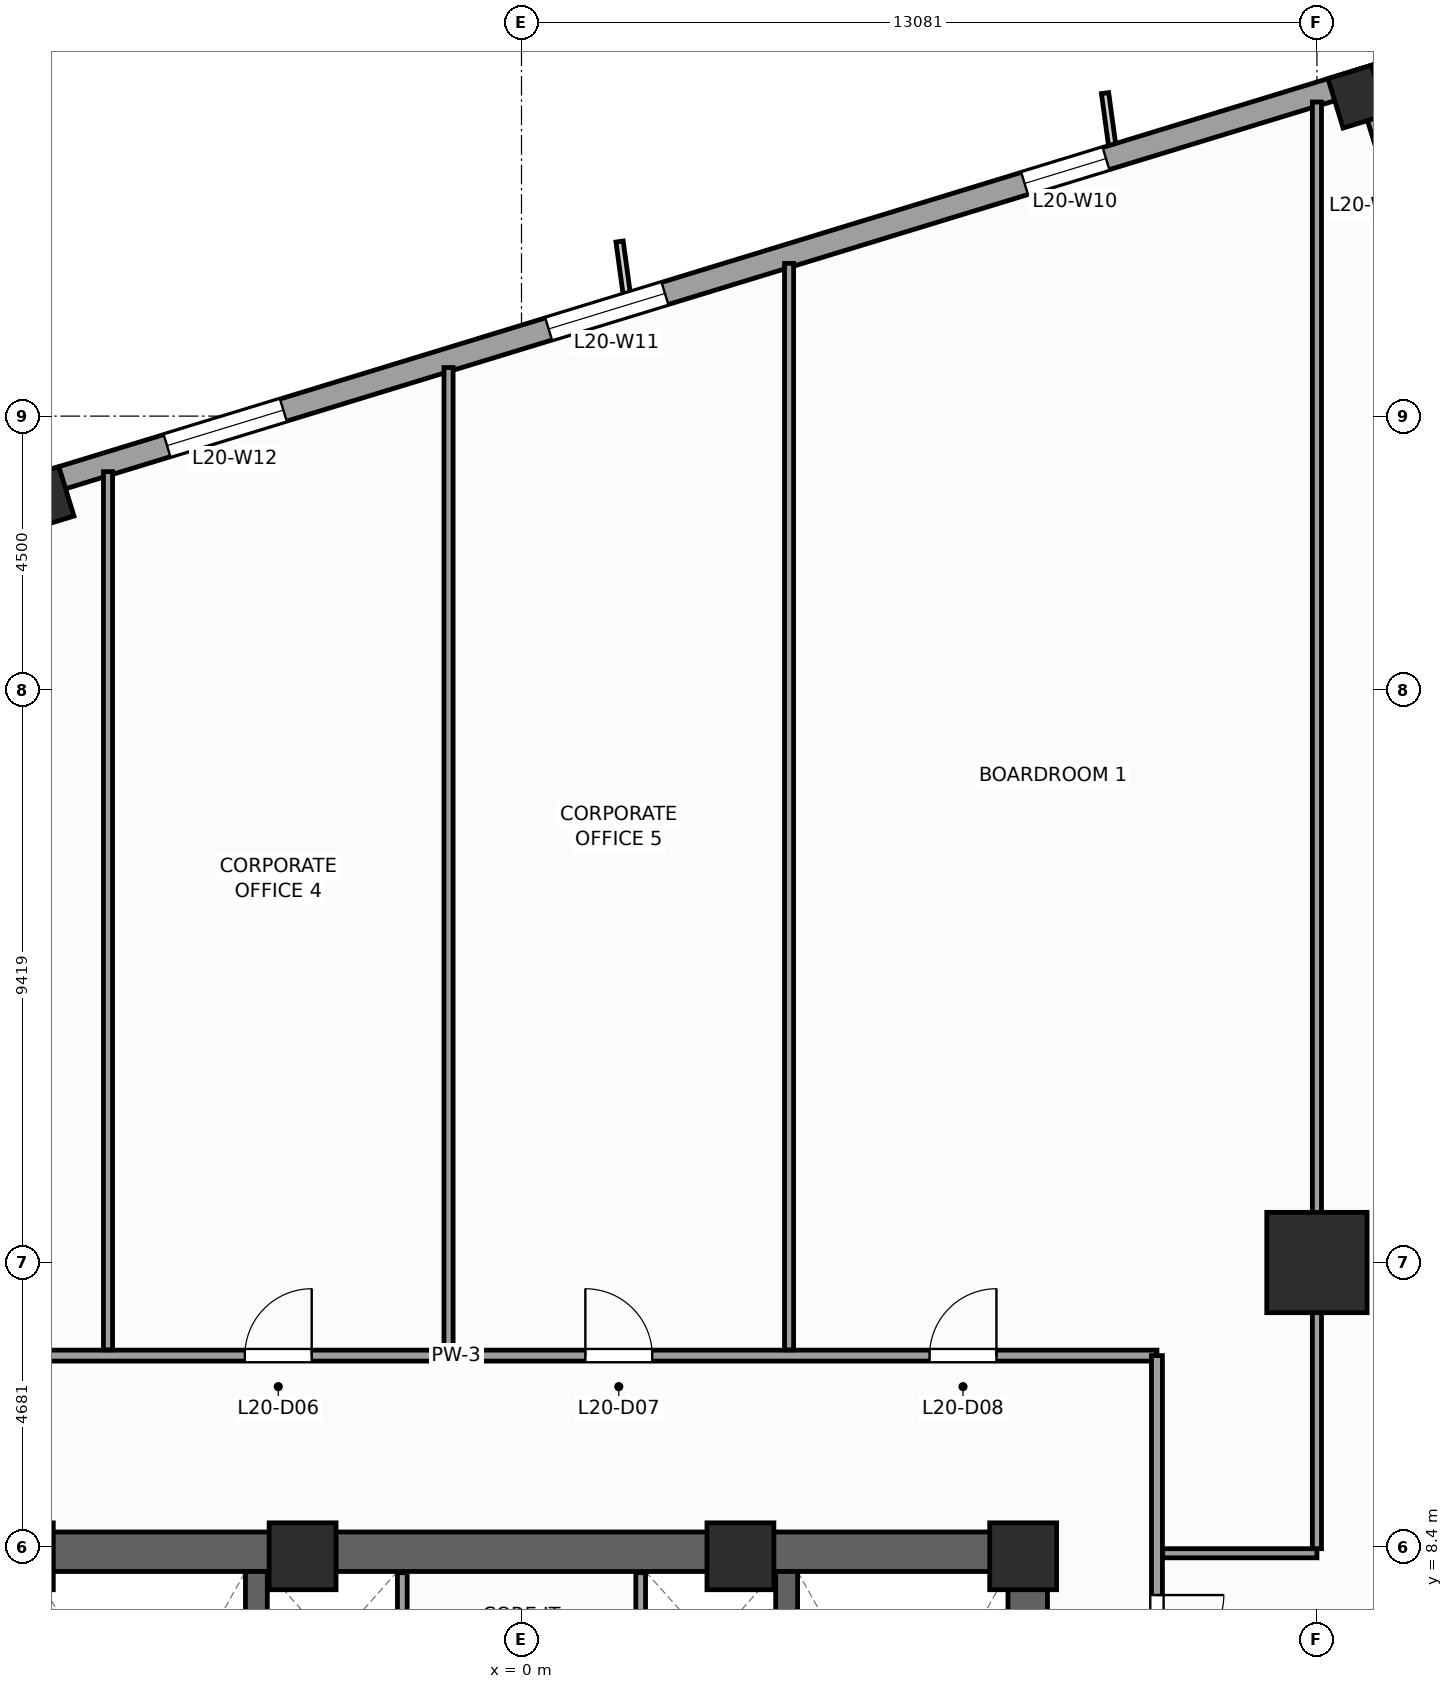
"""IFC4 building model, lengths in metres.
Left out: names, types, materials, properties, quantities, classifications, styles, units other than length and angle.
Written with IfcOpenShell. Run it as: python <this file> out.ifc"""

import sys

from ifc_helpers import new_model, si_unit, direction, frame, frame_2d, origin, origin_2d, place, context, subcontext, project, spatial, rectangle, extrude, source, transform, mapped, element, fill, save


model = new_model("IFC4")
c1 = context("Model", 3, precision=1e-05, world=origin(), true_north=direction((0.0, 1.0)))
c2 = subcontext(c1, "Body", "Model", "MODEL_VIEW")
j1 = project(units=[si_unit("LENGTHUNIT", "METRE"), si_unit("PLANEANGLEUNIT", "RADIAN")], contexts=[c1])
p1 = place(None, origin())
s1 = spatial("IfcSite", under=j1, at=p1, CompositionType="ELEMENT")
p2 = place(p1, origin())
s2 = spatial("IfcBuilding", under=s1, at=p2, CompositionType="ELEMENT")
p3 = place(p2, frame((0.0, 0.0, 87.2)))
s3 = spatial("IfcBuildingStorey", under=s2, at=p3, CompositionType="ELEMENT", Elevation=87.2)
p4 = place(p3, frame((-8.65, 8.325, 0.0), z_axis=(0.0, 0.0, 1.0), x_axis=(1.0, 0.0, 0.0)))
e1 = element("IfcWall", 1, at=p4, inside=s3, PredefinedType="SHEAR", context=c2, shape_type="SweptSolid", body=[
    extrude(rectangle(XDim=17.3, YDim=0.65, at=frame_2d((8.65, 0.0))), origin(), (0.0, 0.0, 1.0), 4.0),
])
p5 = place(p3, frame((8.325, -8.0, 0.0), z_axis=(0.0, 0.0, 1.0), x_axis=(0.0, 1.0, 0.0)))
e2 = element("IfcWall", 2, at=p5, inside=s3, PredefinedType="SHEAR", context=c2, shape_type="SweptSolid", body=[
    extrude(rectangle(XDim=16.0, YDim=0.65, at=frame_2d((8.0, 0.0))), origin(), (0.0, 0.0, 1.0), 4.0),
])
p6 = place(p5, frame((4.69, 0.0, 0.0)))
e3 = element("IfcOpeningElement", 3, at=p6, cuts=e2, PredefinedType="OPENING", context=c2, shape_type="SweptSolid", body=[
    extrude(rectangle(XDim=1.3, YDim=2.2, at=frame_2d((0.65, 1.1))), frame((0.0, 0.335, 0.0), z_axis=(0.0, -1.0, 0.0), x_axis=(1.0, 0.0, 0.0)), (0.0, 0.0, 1.0), 0.67),
])
for number, where, z_axis, x_axis in (
    (4, (-4.36, -8.0, 0.0), (0.0, 0.0, 1.0), (0.0, 1.0, 0.0)),
    (5, (4.36, -8.0, 0.0), (0.0, 0.0, 1.0), (0.0, 1.0, 0.0)),
):
    element("IfcWall", number, at=place(p3, frame(where, z_axis=z_axis, x_axis=x_axis)), inside=s3, PredefinedType="SHEAR", context=c2, shape_type="SweptSolid", body=[
        extrude(rectangle(XDim=16.0, YDim=0.36, at=frame_2d((8.0, 0.0))), origin(), (0.0, 0.0, 1.0), 4.0),
    ])
m1 = source(origin(), c2, "Body", "SweptSolid", [
    extrude(rectangle(XDim=1.1, YDim=1.1, at=origin_2d()), origin(), (0.0, 0.0, 1.0), 4.0),
])
for number, where, z_axis, x_axis in (
    (6, (8.25, 8.25, 0.0), (0.0, 0.0, 1.0), (1.0, 0.0, 0.0)),
    (7, (-8.25, 8.25, 0.0), (0.0, 0.0, 1.0), (1.0, 0.0, 0.0)),
    (8, (-3.6, 8.25, 0.0), (0.0, 0.0, 1.0), (1.0, 0.0, 0.0)),
    (9, (3.6, 8.25, 0.0), (0.0, 0.0, 1.0), (1.0, 0.0, 0.0)),
):
    element("IfcColumn", number, at=place(p3, frame(where, z_axis=z_axis, x_axis=x_axis)), inside=s3, PredefinedType="PILASTER", context=c2, shape_type="MappedRepresentation", body=[
        mapped(m1, transform((0.0, 0.0, 0.0), scale=1.0)),
    ])
m2 = source(origin(), c2, "Body", "SweptSolid", [
    extrude(rectangle(XDim=1.65, YDim=1.65, at=origin_2d()), origin(), (0.0, 0.0, 1.0), 4.0),
])
p7 = place(p3, frame((13.081, 13.081, 0.0), z_axis=(0.0, 0.0, 1.0), x_axis=(1.0, 0.0, 0.0)))
e10 = element("IfcColumn", 10, at=p7, inside=s3, PredefinedType="COLUMN", context=c2, shape_type="MappedRepresentation", body=[
    mapped(m2, transform((0.0, 0.0, 0.0), scale=1.0)),
])
m3 = source(origin(), c2, "Body", "SweptSolid", [
    extrude(rectangle(XDim=0.75, YDim=0.85, at=origin_2d()), origin(), (0.0, 0.0, 1.0), 4.0),
])
for number, where, z_axis, x_axis in (
    (11, (13.746, 32.253, 0.0), (0.0, 0.0, 1.0), (0.956, 0.292, 0.0)),
    (12, (-7.843, 25.653, 0.0), (0.0, 0.0, 1.0), (0.956, 0.292, 0.0)),
):
    element("IfcColumn", number, at=place(p3, frame(where, z_axis=z_axis, x_axis=x_axis)), inside=s3, PredefinedType="COLUMN", context=c2, shape_type="MappedRepresentation", body=[
        mapped(m3, transform((0.0, 0.0, 0.0), scale=1.0)),
    ])
p8 = place(p3, frame((15.144, 28.482, 0.0), z_axis=(0.0, 0.0, 1.0), x_axis=(-0.292373601522, 0.956304176051, 0.0)))
e13 = element("IfcWall", 13, at=p8, inside=s3, PredefinedType="STANDARD", context=c2, shape_type="SweptSolid", body=[
    extrude(rectangle(XDim=4.44, YDim=0.38, at=frame_2d((2.22, 0.0))), origin(), (0.0, 0.0, 1.0), 3.04),
])
p9 = place(p8, frame((1.52, 0.0, 0.51)))
e14 = element("IfcOpeningElement", 14, at=p9, cuts=e13, PredefinedType="OPENING", context=c2, shape_type="SweptSolid", body=[
    extrude(rectangle(XDim=1.4, YDim=2.4, at=frame_2d((0.7, 1.2))), frame((0.0, 0.2, 0.0), z_axis=(0.0, -1.0, 0.0), x_axis=(1.0, 0.0, 0.0)), (0.0, 0.0, 1.0), 0.4),
])
p10 = place(p3, frame((14.265, 32.658, 0.0), z_axis=(0.0, 0.0, 1.0), x_axis=(-0.956304320851, -0.292373127906, 0.0)))
e15 = element("IfcWall", 15, at=p10, inside=s3, PredefinedType="STANDARD", context=c2, shape_type="SweptSolid", body=[
    extrude(rectangle(XDim=46.38, YDim=0.38, at=frame_2d((23.19, 0.0))), origin(), (0.0, 0.0, 1.0), 3.14),
])
p11 = place(p10, frame((29.115, 0.0, 0.0)))
e16 = element("IfcOpeningElement", 16, at=p11, cuts=e15, PredefinedType="OPENING", context=c2, shape_type="SweptSolid", body=[
    extrude(rectangle(XDim=1.05, YDim=2.25, at=frame_2d((0.525, 1.125))), frame((0.0, 0.2, 0.0), z_axis=(0.0, -1.0, 0.0), x_axis=(1.0, 0.0, 0.0)), (0.0, 0.0, 1.0), 0.4),
])
p12 = place(p10, frame((4.865, 0.0, 0.51)))
e17 = element("IfcOpeningElement", 17, at=p12, cuts=e15, PredefinedType="OPENING", context=c2, shape_type="SweptSolid", body=[
    extrude(rectangle(XDim=1.4, YDim=2.4, at=frame_2d((0.7, 1.2))), frame((0.0, 0.2, 0.0), z_axis=(0.0, -1.0, 0.0), x_axis=(1.0, 0.0, 0.0)), (0.0, 0.0, 1.0), 0.4),
])
p13 = place(p10, frame((12.45, 0.0, 0.51)))
e18 = element("IfcOpeningElement", 18, at=p13, cuts=e15, PredefinedType="OPENING", context=c2, shape_type="SweptSolid", body=[
    extrude(rectangle(XDim=2.0, YDim=2.4, at=frame_2d((1.0, 1.2))), frame((0.0, 0.2, 0.0), z_axis=(0.0, -1.0, 0.0), x_axis=(1.0, 0.0, 0.0)), (0.0, 0.0, 1.0), 0.4),
])
p14 = place(p10, frame((19.012, 0.0, 0.51)))
e19 = element("IfcOpeningElement", 19, at=p14, cuts=e15, PredefinedType="OPENING", context=c2, shape_type="SweptSolid", body=[
    extrude(rectangle(XDim=2.0, YDim=2.4, at=frame_2d((1.0, 1.2))), frame((0.0, 0.2, 0.0), z_axis=(0.0, -1.0, 0.0), x_axis=(1.0, 0.0, 0.0)), (0.0, 0.0, 1.0), 0.4),
])
p15 = place(p10, frame((31.288, 0.0, 0.51)))
e20 = element("IfcOpeningElement", 20, at=p15, cuts=e15, PredefinedType="OPENING", context=c2, shape_type="SweptSolid", body=[
    extrude(rectangle(XDim=2.0, YDim=2.4, at=frame_2d((1.0, 1.2))), frame((0.0, 0.2, 0.0), z_axis=(0.0, -1.0, 0.0), x_axis=(1.0, 0.0, 0.0)), (0.0, 0.0, 1.0), 0.4),
])
p16 = place(p10, frame((39.187, 0.0, 0.51)))
e21 = element("IfcOpeningElement", 21, at=p16, cuts=e15, PredefinedType="OPENING", context=c2, shape_type="SweptSolid", body=[
    extrude(rectangle(XDim=1.4, YDim=2.4, at=frame_2d((0.7, 1.2))), frame((0.0, 0.2, 0.0), z_axis=(0.0, -1.0, 0.0), x_axis=(1.0, 0.0, 0.0)), (0.0, 0.0, 1.0), 0.4),
])
for number, where, z_axis, x_axis in (
    (22, (-1.96, 4.58, 0.0), (0.0, 0.0, 1.0), (0.0, 1.0, 0.0)),
    (23, (1.96, 4.58, 0.0), (0.0, 0.0, 1.0), (0.0, 1.0, 0.0)),
):
    element("IfcWall", number, at=place(p3, frame(where, z_axis=z_axis, x_axis=x_axis)), inside=s3, PredefinedType="PARTITIONING", context=c2, shape_type="SweptSolid", body=[
        extrude(rectangle(XDim=3.4, YDim=0.16, at=frame_2d((1.7, 0.0))), origin(), (0.0, 0.0, 1.0), 3.74),
    ])
p17 = place(p3, frame((-12.6, 11.55, 0.0), z_axis=(0.0, 0.0, 1.0), x_axis=(1.0, 0.0, 0.0)))
e24 = element("IfcWall", 24, at=p17, inside=s3, PredefinedType="PARTITIONING", context=c2, shape_type="SweptSolid", body=[
    extrude(rectangle(XDim=23.05, YDim=0.18, at=frame_2d((11.525, 0.0))), origin(), (0.0, 0.0, 1.0), 3.74),
])
p18 = place(p17, frame((2.514, 0.0, 0.0)))
e25 = element("IfcOpeningElement", 25, at=p18, cuts=e24, PredefinedType="OPENING", context=c2, shape_type="SweptSolid", body=[
    extrude(rectangle(XDim=1.1, YDim=2.2, at=frame_2d((0.55, 1.1))), frame((0.0, 0.1, 0.0), z_axis=(0.0, -1.0, 0.0), x_axis=(1.0, 0.0, 0.0)), (0.0, 0.0, 1.0), 0.2),
])
p19 = place(p17, frame((8.05, 0.0, 0.0)))
e26 = element("IfcOpeningElement", 26, at=p19, cuts=e24, PredefinedType="OPENING", context=c2, shape_type="SweptSolid", body=[
    extrude(rectangle(XDim=1.1, YDim=2.2, at=frame_2d((0.55, 1.1))), frame((0.0, 0.1, 0.0), z_axis=(0.0, -1.0, 0.0), x_axis=(1.0, 0.0, 0.0)), (0.0, 0.0, 1.0), 0.2),
])
p20 = place(p17, frame((13.65, 0.0, 0.0)))
e27 = element("IfcOpeningElement", 27, at=p20, cuts=e24, PredefinedType="OPENING", context=c2, shape_type="SweptSolid", body=[
    extrude(rectangle(XDim=1.1, YDim=2.2, at=frame_2d((0.55, 1.1))), frame((0.0, 0.1, 0.0), z_axis=(0.0, -1.0, 0.0), x_axis=(1.0, 0.0, 0.0)), (0.0, 0.0, 1.0), 0.2),
])
p21 = place(p17, frame((19.311, 0.0, 0.0)))
e28 = element("IfcOpeningElement", 28, at=p21, cuts=e24, PredefinedType="OPENING", context=c2, shape_type="SweptSolid", body=[
    extrude(rectangle(XDim=1.1, YDim=2.2, at=frame_2d((0.55, 1.1))), frame((0.0, 0.1, 0.0), z_axis=(0.0, -1.0, 0.0), x_axis=(1.0, 0.0, 0.0)), (0.0, 0.0, 1.0), 0.2),
])
p22 = place(p3, frame((10.45, 3.35, 0.0), z_axis=(0.0, 0.0, 1.0), x_axis=(0.0, 1.0, 0.0)))
e29 = element("IfcWall", 29, at=p22, inside=s3, PredefinedType="PARTITIONING", context=c2, shape_type="SweptSolid", body=[
    extrude(rectangle(XDim=8.2, YDim=0.18, at=frame_2d((4.1, 0.0))), origin(), (0.0, 0.0, 1.0), 3.74),
])
p23 = place(p22, frame((3.163, 0.0, 0.0)))
e30 = element("IfcOpeningElement", 30, at=p23, cuts=e29, PredefinedType="OPENING", context=c2, shape_type="SweptSolid", body=[
    extrude(rectangle(XDim=1.1, YDim=2.2, at=frame_2d((0.55, 1.1))), frame((0.0, 0.1, 0.0), z_axis=(0.0, -1.0, 0.0), x_axis=(1.0, 0.0, 0.0)), (0.0, 0.0, 1.0), 0.2),
])
p24 = place(p3, frame((-6.8, 11.645, 0.0), z_axis=(0.0, 0.0, 1.0), x_axis=(0.0, 1.0, 0.0)))
e31 = element("IfcWall", 31, at=p24, inside=s3, PredefinedType="PARTITIONING", context=c2, shape_type="SweptSolid", body=[
    extrude(rectangle(XDim=14.442, YDim=0.15, at=frame_2d((7.221, 0.0))), origin(), (0.0, 0.0, 1.0), 3.74),
])
p25 = place(p3, frame((-1.2, 11.645, 0.0), z_axis=(0.0, 0.0, 1.0), x_axis=(0.0, 1.0, 0.0)))
e32 = element("IfcWall", 32, at=p25, inside=s3, PredefinedType="PARTITIONING", context=c2, shape_type="SweptSolid", body=[
    extrude(rectangle(XDim=16.154, YDim=0.15, at=frame_2d((8.077, 0.0))), origin(), (0.0, 0.0, 1.0), 3.41),
])
p26 = place(p3, frame((4.4, 11.645, 0.0), z_axis=(0.0, 0.0, 1.0), x_axis=(0.0, 1.0, 0.0)))
e33 = element("IfcWall", 33, at=p26, inside=s3, PredefinedType="PARTITIONING", context=c2, shape_type="SweptSolid", body=[
    extrude(rectangle(XDim=17.866, YDim=0.15, at=frame_2d((8.933, 0.0))), origin(), (0.0, 0.0, 1.0), 3.41),
])
p27 = place(p3, frame((10.545, 8.3, 0.0), z_axis=(0.0, 0.0, 1.0), x_axis=(1.0, 0.0, 0.0)))
e34 = element("IfcWall", 34, at=p27, inside=s3, PredefinedType="PARTITIONING", context=c2, shape_type="SweptSolid", body=[
    extrude(rectangle(XDim=2.536, YDim=0.15, at=frame_2d((1.268, 0.0))), origin(), (0.0, 0.0, 1.0), 3.74),
])
p28 = place(p3, frame((13.081, 8.375, 0.0), z_axis=(0.0, 0.0, 1.0), x_axis=(0.0, 1.0, 0.0)))
e35 = element("IfcWall", 35, at=p28, inside=s3, PredefinedType="PARTITIONING", context=c2, shape_type="SweptSolid", body=[
    extrude(rectangle(XDim=23.79, YDim=0.15, at=frame_2d((11.895, 0.0))), origin(), (0.0, 0.0, 1.0), 2.732),
])
m4 = source(origin(), c2, "Body", "SweptSolid", [
    extrude(rectangle(XDim=1.4, YDim=2.4, at=frame_2d((0.7, 1.2))), frame((0.0, 0.03, 0.0), z_axis=(0.0, -1.0, 0.0), x_axis=(1.0, 0.0, 0.0)), (0.0, 0.0, 1.0), 0.06),
])
p29 = place(p12, origin())
e36 = element("IfcWindow", 36, at=p29, inside=s3, PartitioningType="SINGLE_PANEL", PredefinedType="WINDOW", context=c2, shape_type="MappedRepresentation", body=[
    mapped(m4, transform((0.0, 0.0, 0.0), scale=1.0)),
])
fill(e17, e36)
m5 = source(origin(), c2, "Body", "SweptSolid", [
    extrude(rectangle(XDim=2.0, YDim=2.4, at=frame_2d((1.0, 1.2))), frame((0.0, 0.03, 0.0), z_axis=(0.0, -1.0, 0.0), x_axis=(1.0, 0.0, 0.0)), (0.0, 0.0, 1.0), 0.06),
])
p30 = place(p13, origin())
e37 = element("IfcWindow", 37, at=p30, inside=s3, PartitioningType="SINGLE_PANEL", PredefinedType="WINDOW", context=c2, shape_type="MappedRepresentation", body=[
    mapped(m5, transform((0.0, 0.0, 0.0), scale=1.0)),
])
fill(e18, e37)
p31 = place(p14, origin())
e38 = element("IfcWindow", 38, at=p31, inside=s3, PartitioningType="SINGLE_PANEL", PredefinedType="WINDOW", context=c2, shape_type="MappedRepresentation", body=[
    mapped(m5, transform((0.0, 0.0, 0.0), scale=1.0)),
])
fill(e19, e38)
m6 = source(origin(), c2, "Body", "SweptSolid", [
    extrude(rectangle(XDim=1.1, YDim=2.2, at=frame_2d((0.55, 1.1))), frame((0.0, 0.025, 0.0), z_axis=(0.0, -1.0, 0.0), x_axis=(1.0, 0.0, 0.0)), (0.0, 0.0, 1.0), 0.05),
])
p32 = place(p19, origin())
e39 = element("IfcDoor", 39, at=p32, inside=s3, OperationType="SINGLE_SWING_RIGHT", PredefinedType="DOOR", context=c2, shape_type="MappedRepresentation", body=[
    mapped(m6, transform((0.0, 0.0, 0.0), scale=1.0)),
])
fill(e26, e39)
p33 = place(p20, origin())
e40 = element("IfcDoor", 40, at=p33, inside=s3, OperationType="SINGLE_SWING_LEFT", PredefinedType="DOOR", context=c2, shape_type="MappedRepresentation", body=[
    mapped(m6, transform((0.0, 0.0, 0.0), scale=1.0)),
])
fill(e27, e40)
p34 = place(p21, origin())
e41 = element("IfcDoor", 41, at=p34, inside=s3, OperationType="SINGLE_SWING_RIGHT", PredefinedType="DOOR", context=c2, shape_type="MappedRepresentation", body=[
    mapped(m6, transform((0.0, 0.0, 0.0), scale=1.0)),
])
fill(e28, e41)
p35 = place(p23, frame((1.1, 0.0, 0.0), z_axis=(0.0, 0.0, 1.0), x_axis=(-1.0, 0.0, 0.0)))
e42 = element("IfcDoor", 42, at=p35, inside=s3, OperationType="SINGLE_SWING_RIGHT", PredefinedType="DOOR", context=c2, shape_type="MappedRepresentation", body=[
    mapped(m6, transform((0.0, 0.0, 0.0), scale=1.0)),
])
fill(e30, e42)
save(model, sys.argv[1])
